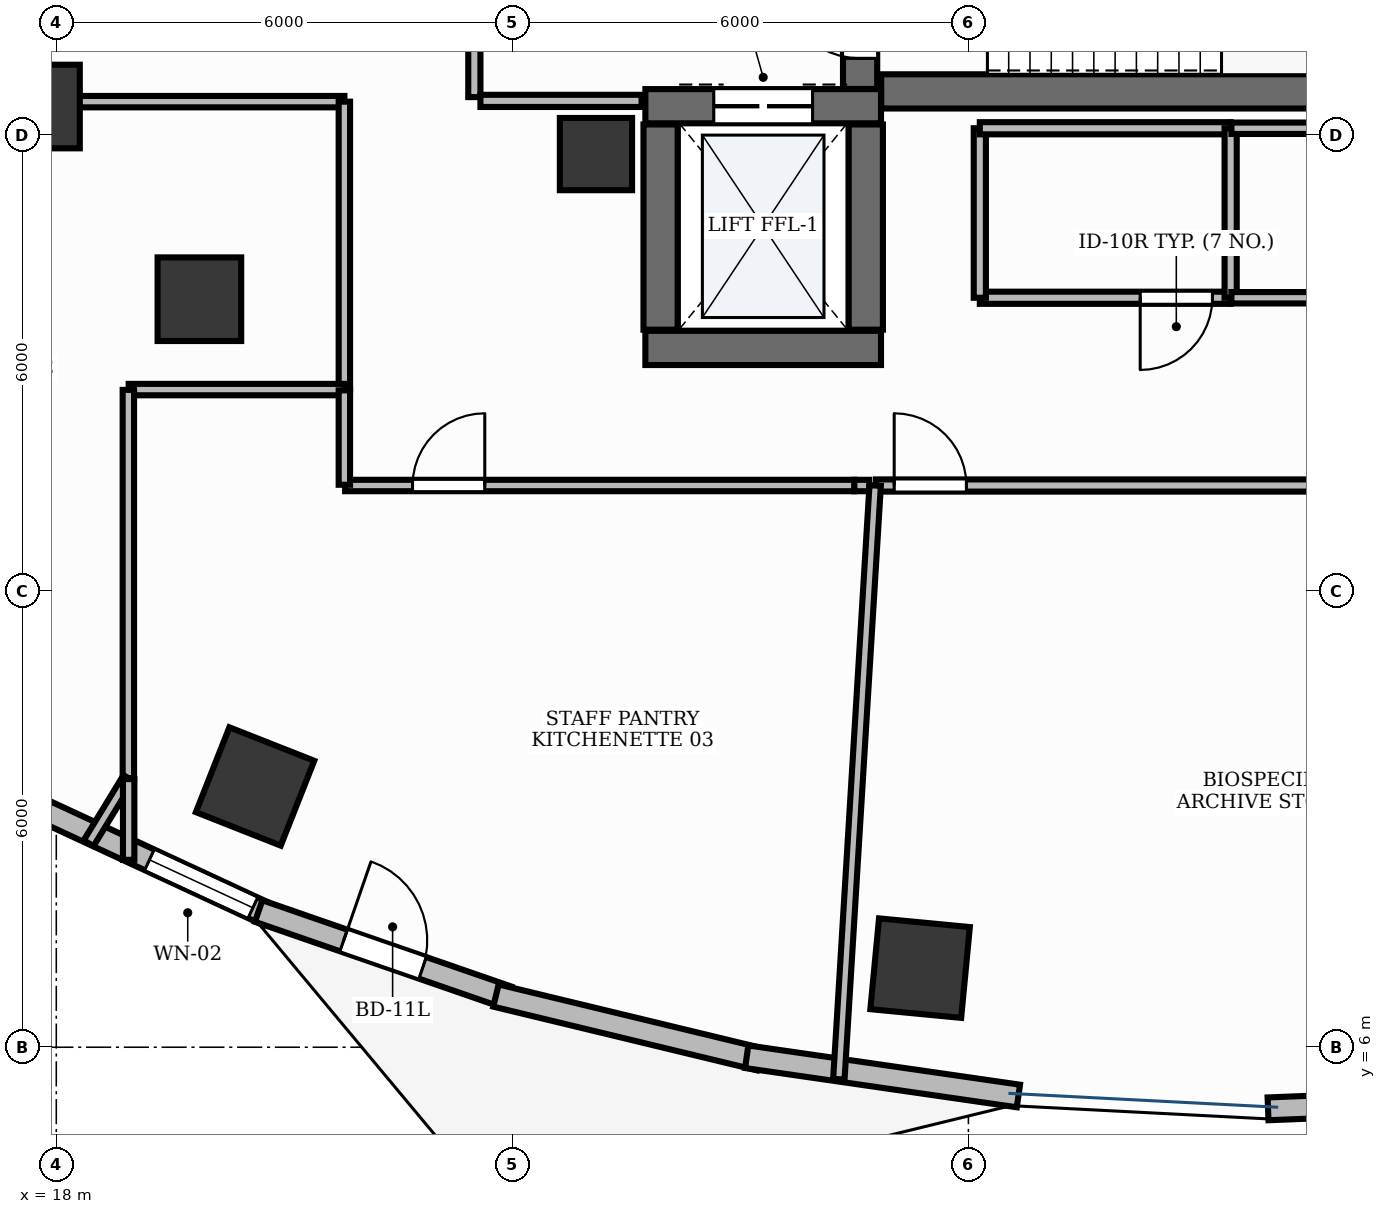
"""IFC4 building model, lengths in metres.
Left out: names, types, materials, properties, quantities, classifications, styles, units other than length and angle.
Written with IfcOpenShell. Run it as: python <this file> out.ifc"""

import sys

from ifc_helpers import new_model, si_unit, direction, frame, frame_2d, origin, origin_2d, place, context, subcontext, project, spatial, rectangle, extrude, element, fill, save


model = new_model("IFC4")
c1 = context("Model", 3, precision=1e-05, world=origin(), true_north=direction((0.0, 1.0)))
c2 = subcontext(c1, "Body", "Model", "MODEL_VIEW")
j1 = project(units=[si_unit("LENGTHUNIT", "METRE"), si_unit("PLANEANGLEUNIT", "RADIAN")], contexts=[c1])
p1 = place(None, origin())
s1 = spatial("IfcSite", under=j1, at=p1, CompositionType="ELEMENT")
p2 = place(p1, origin())
s2 = spatial("IfcBuilding", under=s1, at=p2, CompositionType="ELEMENT")
p3 = place(p2, frame((0.0, 0.0, 144.6)))
s3 = spatial("IfcBuildingStorey", under=s2, at=p3, CompositionType="ELEMENT", Elevation=144.6)
p4 = place(p3, frame((28.852, 18.575, 0.0), z_axis=(0.0, 0.0, 1.0), x_axis=(1.0, 0.0, 0.0)))
e1 = element("IfcWall", 1, at=p4, inside=s3, PredefinedType="SHEAR", context=c2, shape_type="SweptSolid", body=[
    extrude(rectangle(XDim=8.248, YDim=0.45, at=frame_2d((4.124, 0.0))), origin(), (0.0, 0.0, 1.0), 3.88),
])
p5 = place(p3, frame((28.575, 18.607, 0.0), z_axis=(0.0, 0.0, 1.0), x_axis=(0.0, 1.0, 0.0)))
e2 = element("IfcWall", 2, at=p5, inside=s3, PredefinedType="SHEAR", context=c2, shape_type="SweptSolid", body=[
    extrude(rectangle(XDim=3.283, YDim=0.45, at=frame_2d((1.642, 0.0))), origin(), (0.0, 0.0, 1.0), 3.88),
])
p6 = place(p5, frame((0.403, 0.0, 0.0)))
e3 = element("IfcOpeningElement", 3, at=p6, cuts=e2, PredefinedType="OPENING", context=c2, shape_type="SweptSolid", body=[
    extrude(rectangle(XDim=1.05, YDim=2.15, at=frame_2d((0.525, 1.075))), frame((0.0, 0.24, 0.0), z_axis=(0.0, -1.0, 0.0), x_axis=(1.0, 0.0, 0.0)), (0.0, 0.0, 1.0), 0.48),
])
p7 = place(p3, frame((25.75, 15.2, 0.0), z_axis=(0.0, 0.0, 1.0), x_axis=(1.0, 0.0, 0.0)))
e4 = element("IfcWall", 4, at=p7, inside=s3, PredefinedType="SHEAR", context=c2, shape_type="SweptSolid", body=[
    extrude(rectangle(XDim=3.1, YDim=0.45, at=frame_2d((1.55, 0.0))), origin(), (0.0, 0.0, 1.0), 3.88),
])
p8 = place(p3, frame((25.75, 18.38, 0.0), z_axis=(0.0, 0.0, 1.0), x_axis=(1.0, 0.0, 0.0)))
e5 = element("IfcWall", 5, at=p8, inside=s3, PredefinedType="SHEAR", context=c2, shape_type="SweptSolid", body=[
    extrude(rectangle(XDim=3.1, YDim=0.45, at=frame_2d((1.55, 0.0))), origin(), (0.0, 0.0, 1.0), 3.88),
])
p9 = place(p8, frame((0.9, 0.0, 0.0)))
e6 = element("IfcOpeningElement", 6, at=p9, cuts=e5, PredefinedType="OPENING", context=c2, shape_type="SweptSolid", body=[
    extrude(rectangle(XDim=1.3, YDim=2.2, at=frame_2d((0.65, 1.1))), frame((0.0, 0.24, 0.0), z_axis=(0.0, -1.0, 0.0), x_axis=(1.0, 0.0, 0.0)), (0.0, 0.0, 1.0), 0.48),
])
for number, where, z_axis, x_axis in (
    (7, (25.95, 15.44, 0.0), (0.0, 0.0, 1.0), (0.0, 1.0, 0.0)),
    (8, (28.65, 15.44, 0.0), (0.0, 0.0, 1.0), (0.0, 1.0, 0.0)),
):
    element("IfcWall", number, at=place(p3, frame(where, z_axis=z_axis, x_axis=x_axis)), inside=s3, PredefinedType="SHEAR", context=c2, shape_type="SweptSolid", body=[
        extrude(rectangle(XDim=2.7, YDim=0.45, at=frame_2d((1.35, 0.0))), origin(), (0.0, 0.0, 1.0), 3.88),
    ])
p10 = place(p3, frame((25.1, 17.75, -0.0), z_axis=(0.0, 0.0, 1.0), x_axis=(1.0, 0.0, 0.0)))
e9 = element("IfcColumn", 9, at=p10, inside=s3, PredefinedType="PILASTER", context=c2, shape_type="SweptSolid", body=[
    extrude(rectangle(XDim=0.95, YDim=0.95, at=origin_2d()), origin(), (0.0, 0.0, 1.0), 3.881),
])
for number, where, z_axis, x_axis in (
    (10, (17.759, 18.376, -0.0), (0.0, 0.0, 1.0), (1.0, 0.0, 0.0)),
    (11, (19.883, 15.841, -0.0), (0.0, 0.0, 1.0), (1.0, 0.0, 0.0)),
):
    element("IfcColumn", number, at=place(p3, frame(where, z_axis=z_axis, x_axis=x_axis)), inside=s3, PredefinedType="COLUMN", context=c2, shape_type="SweptSolid", body=[
        extrude(rectangle(XDim=1.1, YDim=1.1, at=origin_2d()), origin(), (0.0, 0.0, 1.0), 3.881),
    ])
for number, where, z_axis, x_axis in (
    (12, (20.615, 9.431, -0.0), (0.0, 0.0, 1.0), (-0.93, 0.367, 0.0)),
    (13, (29.364, 7.041, -0.0), (0.0, 0.0, 1.0), (-0.995, 0.095, 0.0)),
):
    element("IfcColumn", number, at=place(p3, frame(where, z_axis=z_axis, x_axis=x_axis)), inside=s3, PredefinedType="COLUMN", context=c2, shape_type="SweptSolid", body=[
        extrude(rectangle(XDim=1.2, YDim=1.2, at=origin_2d()), origin(), (0.0, 0.0, 1.0), 3.881),
    ])
p11 = place(p3, frame((17.713, 9.167, 0.0), z_axis=(0.0, 0.0, 1.0), x_axis=(0.907218110188, -0.42066055264, 0.0)))
e14 = element("IfcWall", 14, at=p11, inside=s3, PredefinedType="STANDARD", context=c2, shape_type="SweptSolid", body=[
    extrude(rectangle(XDim=3.39, YDim=0.3, at=frame_2d((1.695, 0.0))), origin(), (0.0, 0.0, 1.0), 3.88),
])
p12 = place(p11, frame((1.668, 0.0, 0.95)))
e15 = element("IfcOpeningElement", 15, at=p12, cuts=e14, PredefinedType="OPENING", context=c2, shape_type="SweptSolid", body=[
    extrude(rectangle(XDim=1.5, YDim=1.8, at=frame_2d((0.75, 0.9))), frame((0.0, 0.165, 0.0), z_axis=(0.0, -1.0, 0.0), x_axis=(1.0, 0.0, 0.0)), (0.0, 0.0, 1.0), 0.33),
])
p13 = place(p3, frame((20.662, 7.792, 0.0), z_axis=(0.0, 0.0, 1.0), x_axis=(0.944878029854, -0.3274225232, 0.0)))
e16 = element("IfcWall", 16, at=p13, inside=s3, PredefinedType="STANDARD", context=c2, shape_type="SweptSolid", body=[
    extrude(rectangle(XDim=3.467, YDim=0.3, at=frame_2d((1.734, 0.0))), origin(), (0.0, 0.0, 1.0), 3.88),
])
p14 = place(p13, frame((1.184, 0.0, 0.0)))
e17 = element("IfcOpeningElement", 17, at=p14, cuts=e16, PredefinedType="OPENING", context=c2, shape_type="SweptSolid", body=[
    extrude(rectangle(XDim=1.1, YDim=2.15, at=frame_2d((0.55, 1.075))), frame((0.0, 0.165, 0.0), z_axis=(0.0, -1.0, 0.0), x_axis=(1.0, 0.0, 0.0)), (0.0, 0.0, 1.0), 0.33),
])
p15 = place(p3, frame((23.784, 6.68, 0.0), z_axis=(0.0, 0.0, 1.0), x_axis=(0.972043452321, -0.234801036625, 0.0)))
e18 = element("IfcWall", 18, at=p15, inside=s3, PredefinedType="STANDARD", context=c2, shape_type="SweptSolid", body=[
    extrude(rectangle(XDim=3.569, YDim=0.3, at=frame_2d((1.784, 0.0))), origin(), (0.0, 0.0, 1.0), 3.88),
])
p16 = place(p3, frame((27.083, 5.875, 0.0), z_axis=(0.0, 0.0, 1.0), x_axis=(0.989734732902, -0.142916613754, 0.0)))
e19 = element("IfcWall", 19, at=p16, inside=s3, PredefinedType="STANDARD", context=c2, shape_type="SweptSolid", body=[
    extrude(rectangle(XDim=3.611, YDim=0.3, at=frame_2d((1.806, 0.0))), origin(), (0.0, 0.0, 1.0), 3.88),
])
p17 = place(p3, frame((33.942, 5.189, 0.0), z_axis=(0.0, 0.0, 1.0), x_axis=(0.999212076676, 0.039689114679, 0.0)))
e20 = element("IfcWall", 20, at=p17, inside=s3, PredefinedType="STANDARD", context=c2, shape_type="SweptSolid", body=[
    extrude(rectangle(XDim=3.635, YDim=0.3, at=frame_2d((1.818, 0.0))), origin(), (0.0, 0.0, 1.0), 3.88),
])
p18 = place(p3, frame((23.5, 18.5, 0.0), z_axis=(0.0, 0.0, 1.0), x_axis=(0.0, 1.0, 0.0)))
e21 = element("IfcWall", 21, at=p18, inside=s3, PredefinedType="PARTITIONING", context=c2, shape_type="SweptSolid", body=[
    extrude(rectangle(XDim=3.4, YDim=0.16, at=frame_2d((1.7, 0.0))), origin(), (0.0, 0.0, 1.0), 2.22),
])
p19 = place(p18, frame((1.175, 0.0, 0.0)))
e22 = element("IfcOpeningElement", 22, at=p19, cuts=e21, PredefinedType="OPENING", context=c2, shape_type="SweptSolid", body=[
    extrude(rectangle(XDim=1.05, YDim=2.15, at=frame_2d((0.525, 1.075))), frame((0.0, 0.095, 0.0), z_axis=(0.0, -1.0, 0.0), x_axis=(1.0, 0.0, 0.0)), (0.0, 0.0, 1.0), 0.19),
])
p20 = place(p3, frame((23.58, 18.45, 0.0), z_axis=(0.0, 0.0, 1.0), x_axis=(1.0, 0.0, 0.0)))
e23 = element("IfcWall", 23, at=p20, inside=s3, PredefinedType="PARTITIONING", context=c2, shape_type="SweptSolid", body=[
    extrude(rectangle(XDim=2.12, YDim=0.16, at=frame_2d((1.06, 0.0))), origin(), (0.0, 0.0, 1.0), 2.22),
])
p21 = place(p3, frame((33.45, 15.86, 0.0), z_axis=(0.0, 0.0, 1.0), x_axis=(-1.0, 0.0, 0.0)))
e24 = element("IfcWall", 24, at=p21, inside=s3, PredefinedType="PARTITIONING", context=c2, shape_type="SweptSolid", body=[
    extrude(rectangle(XDim=3.3, YDim=0.16, at=frame_2d((1.65, 0.0))), origin(), (0.0, 0.0, 1.0), 2.22),
])
p22 = place(p21, frame((0.24, 0.0, 0.0)))
e25 = element("IfcOpeningElement", 25, at=p22, cuts=e24, PredefinedType="OPENING", context=c2, shape_type="SweptSolid", body=[
    extrude(rectangle(XDim=0.95, YDim=2.15, at=frame_2d((0.475, 1.075))), frame((0.0, 0.095, 0.0), z_axis=(0.0, -1.0, 0.0), x_axis=(1.0, 0.0, 0.0)), (0.0, 0.0, 1.0), 0.19),
])
p23 = place(p3, frame((11.59, 18.44, 0.0), z_axis=(0.0, 0.0, 1.0), x_axis=(1.0, 0.0, 0.0)))
e26 = element("IfcWall", 26, at=p23, inside=s3, PredefinedType="PARTITIONING", context=c2, shape_type="SweptSolid", body=[
    extrude(rectangle(XDim=10.2, YDim=0.15, at=frame_2d((5.1, 0.0))), origin(), (0.0, 0.0, 1.0), 2.22),
])
p24 = place(p23, frame((1.202, 0.0, 0.0)))
e27 = element("IfcOpeningElement", 27, at=p24, cuts=e26, PredefinedType="OPENING", context=c2, shape_type="SweptSolid", body=[
    extrude(rectangle(XDim=0.95, YDim=2.15, at=frame_2d((0.475, 1.075))), frame((0.0, 0.09, 0.0), z_axis=(0.0, -1.0, 0.0), x_axis=(1.0, 0.0, 0.0)), (0.0, 0.0, 1.0), 0.18),
])
p25 = place(p3, frame((21.8, 13.39, 0.0), z_axis=(0.0, 0.0, 1.0), x_axis=(1.0, 0.0, 0.0)))
e28 = element("IfcWall", 28, at=p25, inside=s3, PredefinedType="PARTITIONING", context=c2, shape_type="SweptSolid", body=[
    extrude(rectangle(XDim=6.7, YDim=0.15, at=frame_2d((3.35, 0.0))), origin(), (0.0, 0.0, 1.0), 2.22),
])
p26 = place(p25, frame((0.887, 0.0, 0.0)))
e29 = element("IfcOpeningElement", 29, at=p26, cuts=e28, PredefinedType="OPENING", context=c2, shape_type="SweptSolid", body=[
    extrude(rectangle(XDim=0.95, YDim=2.15, at=frame_2d((0.475, 1.075))), frame((0.0, 0.09, 0.0), z_axis=(0.0, -1.0, 0.0), x_axis=(1.0, 0.0, 0.0)), (0.0, 0.0, 1.0), 0.18),
])
p27 = place(p3, frame((28.783, 13.39, 0.0), z_axis=(0.0, 0.0, 1.0), x_axis=(1.0, 0.0, 0.0)))
e30 = element("IfcWall", 30, at=p27, inside=s3, PredefinedType="PARTITIONING", context=c2, shape_type="SweptSolid", body=[
    extrude(rectangle(XDim=6.817, YDim=0.16, at=frame_2d((3.408, 0.0))), origin(), (0.0, 0.0, 1.0), 2.22),
])
p28 = place(p27, frame((0.24, 0.0, 0.0)))
e31 = element("IfcOpeningElement", 31, at=p28, cuts=e30, PredefinedType="OPENING", context=c2, shape_type="SweptSolid", body=[
    extrude(rectangle(XDim=0.95, YDim=2.15, at=frame_2d((0.475, 1.075))), frame((0.0, 0.095, 0.0), z_axis=(0.0, -1.0, 0.0), x_axis=(1.0, 0.0, 0.0)), (0.0, 0.0, 1.0), 0.19),
])
p29 = place(p3, frame((30.15, 15.86, 0.0), z_axis=(0.0, 0.0, 1.0), x_axis=(0.0, 1.0, 0.0)))
e32 = element("IfcWall", 32, at=p29, inside=s3, PredefinedType="PARTITIONING", context=c2, shape_type="SweptSolid", body=[
    extrude(rectangle(XDim=2.23, YDim=0.16, at=frame_2d((1.115, 0.0))), origin(), (0.0, 0.0, 1.0), 2.22),
])
p30 = place(p3, frame((30.15, 18.09, 0.0), z_axis=(0.0, 0.0, 1.0), x_axis=(1.0, 0.0, 0.0)))
e33 = element("IfcWall", 33, at=p30, inside=s3, PredefinedType="PARTITIONING", context=c2, shape_type="SweptSolid", body=[
    extrude(rectangle(XDim=3.3, YDim=0.16, at=frame_2d((1.65, 0.0))), origin(), (0.0, 0.0, 1.0), 2.22),
])
p31 = place(p3, frame((33.45, 18.09, 0.0), z_axis=(0.0, 0.0, 1.0), x_axis=(0.0, -1.0, 0.0)))
e34 = element("IfcWall", 34, at=p31, inside=s3, PredefinedType="PARTITIONING", context=c2, shape_type="SweptSolid", body=[
    extrude(rectangle(XDim=2.23, YDim=0.16, at=frame_2d((1.115, 0.0))), origin(), (0.0, 0.0, 1.0), 2.22),
])
p32 = place(p3, frame((21.79, 18.44, 0.0), z_axis=(0.0, 0.0, 1.0), x_axis=(0.0, -1.0, 0.0)))
e35 = element("IfcWall", 35, at=p32, inside=s3, PredefinedType="PARTITIONING", context=c2, shape_type="SweptSolid", body=[
    extrude(rectangle(XDim=3.788, YDim=0.15, at=frame_2d((1.894, 0.0))), origin(), (0.0, 0.0, 1.0), 2.22),
])
p33 = place(p3, frame((21.79, 14.652, 0.0), z_axis=(0.0, 0.0, 1.0), x_axis=(-1.0, 0.0, 0.0)))
e36 = element("IfcWall", 36, at=p33, inside=s3, PredefinedType="PARTITIONING", context=c2, shape_type="SweptSolid", body=[
    extrude(rectangle(XDim=2.838, YDim=0.15, at=frame_2d((1.419, 0.0))), origin(), (0.0, 0.0, 1.0), 2.22),
])
p34 = place(p3, frame((18.948, 14.648, 0.0), z_axis=(0.0, 0.0, 1.0), x_axis=(0.0, -1.0, 0.0)))
e37 = element("IfcWall", 37, at=p34, inside=s3, PredefinedType="PARTITIONING", context=c2, shape_type="SweptSolid", body=[
    extrude(rectangle(XDim=5.107, YDim=0.15, at=frame_2d((2.554, 0.0))), origin(), (0.0, 0.0, 1.0), 2.22),
])
p35 = place(p3, frame((18.948, 9.54, 0.0), z_axis=(0.0, 0.0, 1.0), x_axis=(-0.520996942726, -0.853558542615, 0.0)))
e38 = element("IfcWall", 38, at=p35, inside=s3, PredefinedType="PARTITIONING", context=c2, shape_type="SweptSolid", body=[
    extrude(rectangle(XDim=1.003, YDim=0.15, at=frame_2d((0.501, 0.0))), origin(), (0.0, 0.0, 1.0), 2.22),
])
p36 = place(p3, frame((18.952, 8.466, 0.0), z_axis=(0.0, 0.0, 1.0), x_axis=(0.0, 1.0, 0.0)))
e39 = element("IfcWall", 39, at=p36, inside=s3, PredefinedType="PARTITIONING", context=c2, shape_type="SweptSolid", body=[
    extrude(rectangle(XDim=1.062, YDim=0.15, at=frame_2d((0.531, 0.0))), origin(), (0.0, 0.0, 1.0), 2.22),
])
p37 = place(p3, frame((21.79, 14.642, 0.0), z_axis=(0.0, 0.0, 1.0), x_axis=(0.0, -1.0, 0.0)))
e40 = element("IfcWall", 40, at=p37, inside=s3, PredefinedType="PARTITIONING", context=c2, shape_type="SweptSolid", body=[
    extrude(rectangle(XDim=1.242, YDim=0.15, at=frame_2d((0.621, 0.0))), origin(), (0.0, 0.0, 1.0), 2.22),
])
p38 = place(p3, frame((28.5, 13.39, 0.0), z_axis=(0.0, 0.0, 1.0), x_axis=(1.0, 0.0, 0.0)))
e41 = element("IfcWall", 41, at=p38, inside=s3, PredefinedType="PARTITIONING", context=c2, shape_type="SweptSolid", body=[
    extrude(rectangle(XDim=0.195, YDim=0.15, at=frame_2d((0.098, 0.0))), origin(), (0.0, 0.0, 1.0), 2.22),
])
p39 = place(p3, frame((28.773, 13.39, 0.0), z_axis=(0.0, 0.0, 1.0), x_axis=(-0.061057412428, -0.998134255693, 0.0)))
e42 = element("IfcWall", 42, at=p39, inside=s3, PredefinedType="PARTITIONING", context=c2, shape_type="SweptSolid", body=[
    extrude(rectangle(XDim=7.825, YDim=0.15, at=frame_2d((3.913, 0.0))), origin(), (0.0, 0.0, 1.0), 2.22),
])
p40 = place(p3, frame((36.4, 15.86, 0.0), z_axis=(0.0, 0.0, 1.0), x_axis=(-1.0, 0.0, 0.0)))
e43 = element("IfcWall", 43, at=p40, inside=s3, PredefinedType="PARTITIONING", context=c2, shape_type="SweptSolid", body=[
    extrude(rectangle(XDim=2.94, YDim=0.15, at=frame_2d((1.47, 0.0))), origin(), (0.0, 0.0, 1.0), 2.22),
])
p41 = place(p3, frame((33.46, 18.09, 0.0), z_axis=(0.0, 0.0, 1.0), x_axis=(1.0, 0.0, 0.0)))
e44 = element("IfcWall", 44, at=p41, inside=s3, PredefinedType="PARTITIONING", context=c2, shape_type="SweptSolid", body=[
    extrude(rectangle(XDim=3.89, YDim=0.15, at=frame_2d((1.945, 0.0))), origin(), (0.0, 0.0, 1.0), 2.22),
])
p42 = place(p12, origin())
e45 = element("IfcWindow", 45, at=p42, inside=s3, PartitioningType="DOUBLE_PANEL_VERTICAL", PredefinedType="WINDOW", context=c2, shape_type="SweptSolid", body=[
    extrude(rectangle(XDim=1.5, YDim=1.8, at=frame_2d((0.75, 0.9))), frame((0.0, 0.03, 0.0), z_axis=(0.0, -1.0, 0.0), x_axis=(1.0, 0.0, 0.0)), (0.0, 0.0, 1.0), 0.06),
])
fill(e15, e45)
p43 = place(p14, origin())
e46 = element("IfcDoor", 46, at=p43, inside=s3, OperationType="SINGLE_SWING_LEFT", PredefinedType="DOOR", context=c2, shape_type="SweptSolid", body=[
    extrude(rectangle(XDim=1.1, YDim=2.15, at=frame_2d((0.55, 1.075))), frame((0.0, 0.025, 0.0), z_axis=(0.0, -1.0, 0.0), x_axis=(1.0, 0.0, 0.0)), (0.0, 0.0, 1.0), 0.05),
])
fill(e17, e46)
p44 = place(p6, origin())
e47 = element("IfcDoor", 47, at=p44, inside=s3, OperationType="SINGLE_SWING_RIGHT", PredefinedType="DOOR", context=c2, shape_type="SweptSolid", body=[
    extrude(rectangle(XDim=1.05, YDim=2.15, at=frame_2d((0.525, 1.075))), frame((0.0, 0.025, 0.0), z_axis=(0.0, -1.0, 0.0), x_axis=(1.0, 0.0, 0.0)), (0.0, 0.0, 1.0), 0.05),
])
fill(e3, e47)
p45 = place(p9, origin())
e48 = element("IfcDoor", 48, at=p45, inside=s3, OperationType="DOUBLE_DOOR_SLIDING", PredefinedType="DOOR", context=c2, shape_type="SweptSolid", body=[
    extrude(rectangle(XDim=1.3, YDim=2.2, at=frame_2d((0.65, 1.1))), frame((0.0, 0.025, 0.0), z_axis=(0.0, -1.0, 0.0), x_axis=(1.0, 0.0, 0.0)), (0.0, 0.0, 1.0), 0.05),
])
fill(e6, e48)
p46 = place(p22, origin())
e49 = element("IfcDoor", 49, at=p46, inside=s3, OperationType="SINGLE_SWING_RIGHT", PredefinedType="DOOR", context=c2, shape_type="SweptSolid", body=[
    extrude(rectangle(XDim=0.95, YDim=2.15, at=frame_2d((0.475, 1.075))), frame((0.0, 0.025, 0.0), z_axis=(0.0, -1.0, 0.0), x_axis=(1.0, 0.0, 0.0)), (0.0, 0.0, 1.0), 0.05),
])
fill(e25, e49)
p47 = place(p26, origin())
e50 = element("IfcDoor", 50, at=p47, inside=s3, OperationType="SINGLE_SWING_RIGHT", PredefinedType="DOOR", context=c2, shape_type="SweptSolid", body=[
    extrude(rectangle(XDim=0.95, YDim=2.15, at=frame_2d((0.475, 1.075))), frame((0.0, 0.025, 0.0), z_axis=(0.0, -1.0, 0.0), x_axis=(1.0, 0.0, 0.0)), (0.0, 0.0, 1.0), 0.05),
])
fill(e29, e50)
p48 = place(p28, origin())
e51 = element("IfcDoor", 51, at=p48, inside=s3, OperationType="SINGLE_SWING_LEFT", PredefinedType="DOOR", context=c2, shape_type="SweptSolid", body=[
    extrude(rectangle(XDim=0.95, YDim=2.15, at=frame_2d((0.475, 1.075))), frame((0.0, 0.025, 0.0), z_axis=(0.0, -1.0, 0.0), x_axis=(1.0, 0.0, 0.0)), (0.0, 0.0, 1.0), 0.05),
])
fill(e31, e51)
save(model, sys.argv[1])
